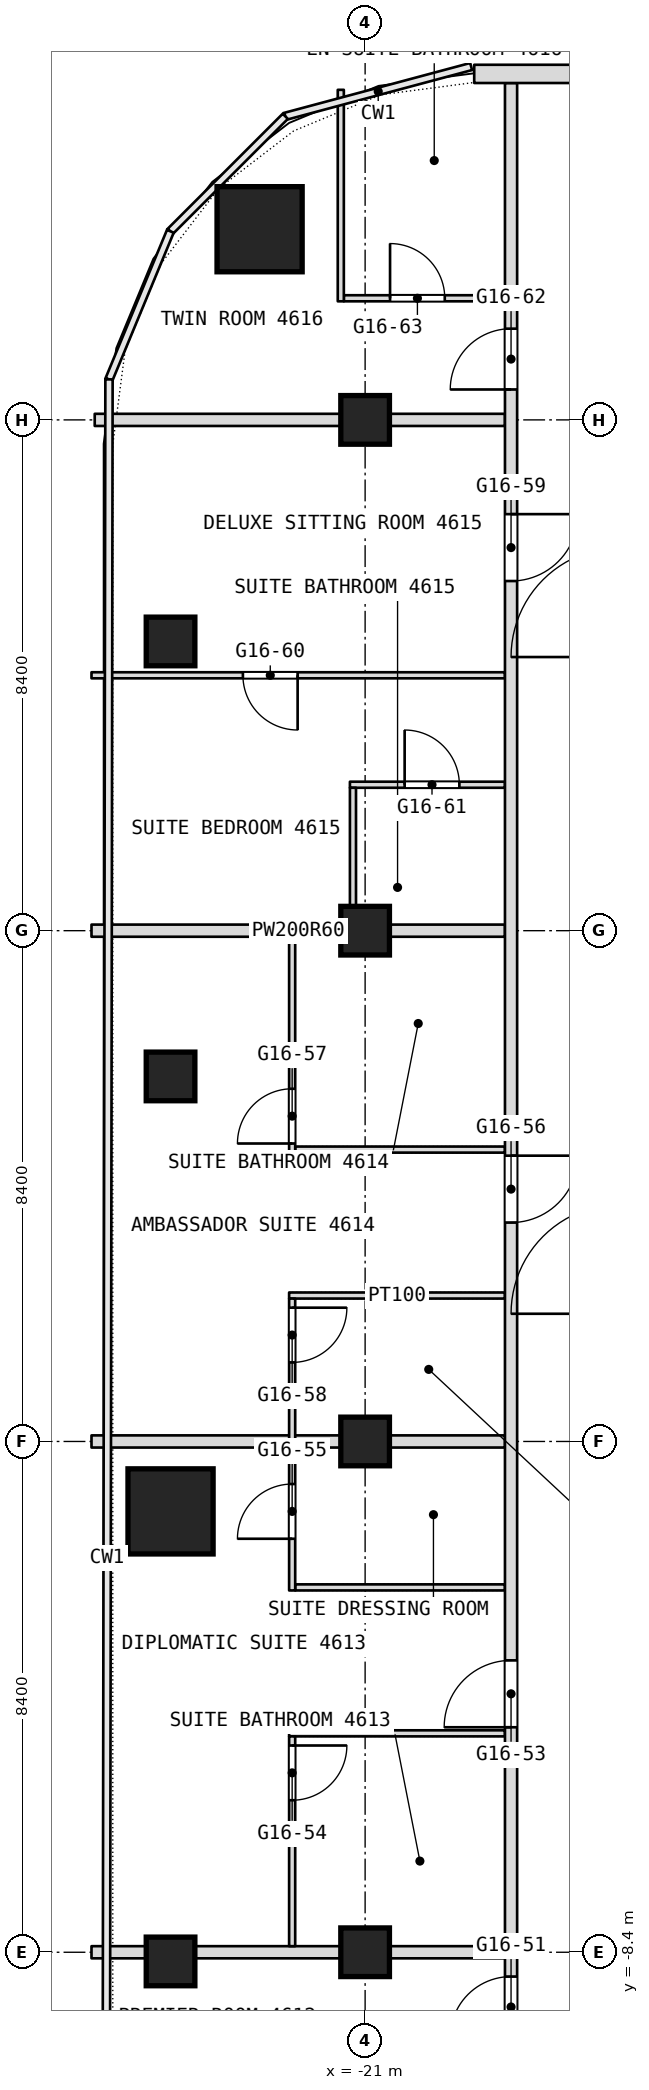
"""IFC4 building model, lengths in metres.
Left out: names, types, materials, properties, quantities, classifications, styles, units other than length and angle.
Written with IfcOpenShell. Run it as: python <this file> out.ifc"""

import sys

from ifc_helpers import new_model, si_unit, direction, frame, frame_2d, origin, origin_2d, place, context, subcontext, project, spatial, rectangle, extrude, element, fill, save


model = new_model("IFC4")
c1 = context("Model", 3, precision=1e-05, world=origin(), true_north=direction((0.0, 1.0)))
c2 = subcontext(c1, "Body", "Model", "MODEL_VIEW")
j1 = project(units=[si_unit("LENGTHUNIT", "METRE"), si_unit("PLANEANGLEUNIT", "RADIAN")], contexts=[c1])
p1 = place(None, origin())
s1 = spatial("IfcSite", under=j1, at=p1, CompositionType="ELEMENT")
p2 = place(p1, origin())
s2 = spatial("IfcBuilding", under=s1, at=p2, CompositionType="ELEMENT")
p3 = place(p2, frame((0.0, 0.0, 202.1)))
s3 = spatial("IfcBuildingStorey", under=s2, at=p3, CompositionType="ELEMENT", Elevation=202.1)
for number, where, z_axis, x_axis in (
    (1, (-22.736, 19.936, 0.0), (0.0, 0.0, 1.0), (1.0, 0.0, 0.0)),
    (2, (-24.2, -1.15, 0.0), (0.0, 0.0, 1.0), (1.0, 0.0, 0.0)),
):
    element("IfcColumn", number, at=place(p3, frame(where, z_axis=z_axis, x_axis=x_axis)), inside=s3, PredefinedType="COLUMN", context=c2, shape_type="SweptSolid", body=[
        extrude(rectangle(XDim=1.4, YDim=1.4, at=origin_2d()), origin(), (0.0, 0.0, 1.0), 3.6),
    ])
for number, where, z_axis, x_axis in (
    (3, (-21.0, -8.4, 0.0), (0.0, 0.0, 1.0), (1.0, 0.0, 0.0)),
    (4, (-21.0, 0.0, 0.0), (0.0, 0.0, 1.0), (1.0, 0.0, 0.0)),
    (5, (-21.0, 8.4, 0.0), (0.0, 0.0, 1.0), (1.0, 0.0, 0.0)),
    (6, (-21.0, 16.8, 0.0), (0.0, 0.0, 1.0), (1.0, 0.0, 0.0)),
    (7, (-24.2, -8.551, 0.0), (0.0, 0.0, 1.0), (1.0, 0.0, 0.0)),
    (8, (-24.2, 6.003, 0.0), (0.0, 0.0, 1.0), (1.0, 0.0, 0.0)),
    (9, (-24.2, 13.156, 0.0), (0.0, 0.0, 1.0), (1.0, 0.0, 0.0)),
):
    element("IfcColumn", number, at=place(p3, frame(where, z_axis=z_axis, x_axis=x_axis)), inside=s3, PredefinedType="COLUMN", context=c2, shape_type="SweptSolid", body=[
        extrude(rectangle(XDim=0.8, YDim=0.8, at=origin_2d()), origin(), (0.0, 0.0, 1.0), 3.6),
    ])
p4 = place(p3, frame((-25.5, -8.4, 0.0), z_axis=(0.0, 0.0, 1.0), x_axis=(1.0, 0.0, 0.0)))
e10 = element("IfcWall", 10, at=p4, inside=s3, PredefinedType="PARTITIONING", context=c2, shape_type="SweptSolid", body=[
    extrude(rectangle(XDim=6.8, YDim=0.2, at=frame_2d((3.4, 0.0))), origin(), (0.0, 0.0, 1.0), 2.94),
])
p5 = place(p3, frame((-22.25, -4.8, 0.0), z_axis=(0.0, 0.0, 1.0), x_axis=(1.0, 0.0, 0.0)))
e11 = element("IfcWall", 11, at=p5, inside=s3, PredefinedType="PARTITIONING", context=c2, shape_type="SweptSolid", body=[
    extrude(rectangle(XDim=3.55, YDim=0.1, at=frame_2d((1.775, 0.0))), origin(), (0.0, 0.0, 1.0), 3.34),
])
p6 = place(p3, frame((-22.15, -2.4, 0.0), z_axis=(0.0, 0.0, 1.0), x_axis=(1.0, 0.0, 0.0)))
e12 = element("IfcWall", 12, at=p6, inside=s3, PredefinedType="PARTITIONING", context=c2, shape_type="SweptSolid", body=[
    extrude(rectangle(XDim=3.45, YDim=0.1, at=frame_2d((1.725, 0.0))), origin(), (0.0, 0.0, 1.0), 3.34),
])
p7 = place(p3, frame((-25.5, 0.0, 0.0), z_axis=(0.0, 0.0, 1.0), x_axis=(1.0, 0.0, 0.0)))
e13 = element("IfcWall", 13, at=p7, inside=s3, PredefinedType="PARTITIONING", context=c2, shape_type="SweptSolid", body=[
    extrude(rectangle(XDim=6.8, YDim=0.2, at=frame_2d((3.4, 0.0))), origin(), (0.0, 0.0, 1.0), 2.94),
])
p8 = place(p3, frame((-22.25, 2.4, 0.0), z_axis=(0.0, 0.0, 1.0), x_axis=(1.0, 0.0, 0.0)))
e14 = element("IfcWall", 14, at=p8, inside=s3, PredefinedType="PARTITIONING", context=c2, shape_type="SweptSolid", body=[
    extrude(rectangle(XDim=3.55, YDim=0.1, at=frame_2d((1.775, 0.0))), origin(), (0.0, 0.0, 1.0), 3.34),
])
p9 = place(p3, frame((-22.15, 4.8, 0.0), z_axis=(0.0, 0.0, 1.0), x_axis=(1.0, 0.0, 0.0)))
e15 = element("IfcWall", 15, at=p9, inside=s3, PredefinedType="PARTITIONING", context=c2, shape_type="SweptSolid", body=[
    extrude(rectangle(XDim=3.45, YDim=0.1, at=frame_2d((1.725, 0.0))), origin(), (0.0, 0.0, 1.0), 3.34),
])
p10 = place(p3, frame((-25.5, 8.4, 0.0), z_axis=(0.0, 0.0, 1.0), x_axis=(1.0, 0.0, 0.0)))
e16 = element("IfcWall", 16, at=p10, inside=s3, PredefinedType="PARTITIONING", context=c2, shape_type="SweptSolid", body=[
    extrude(rectangle(XDim=6.8, YDim=0.2, at=frame_2d((3.4, 0.0))), origin(), (0.0, 0.0, 1.0), 2.94),
])
p11 = place(p3, frame((-21.25, 10.8, 0.0), z_axis=(0.0, 0.0, 1.0), x_axis=(1.0, 0.0, 0.0)))
e17 = element("IfcWall", 17, at=p11, inside=s3, PredefinedType="PARTITIONING", context=c2, shape_type="SweptSolid", body=[
    extrude(rectangle(XDim=2.55, YDim=0.1, at=frame_2d((1.275, 0.0))), origin(), (0.0, 0.0, 1.0), 3.34),
])
p12 = place(p11, frame((0.9, 0.0, 0.0)))
e18 = element("IfcOpeningElement", 18, at=p12, cuts=e17, PredefinedType="OPENING", context=c2, shape_type="SweptSolid", body=[
    extrude(rectangle(XDim=0.9, YDim=2.1, at=frame_2d((0.45, 1.05))), frame((0.0, 0.05, 0.0), z_axis=(0.0, -1.0, 0.0), x_axis=(1.0, 0.0, 0.0)), (0.0, 0.0, 1.0), 0.1),
])
p13 = place(p3, frame((-25.5, 12.6, 0.0), z_axis=(0.0, 0.0, 1.0), x_axis=(1.0, 0.0, 0.0)))
e19 = element("IfcWall", 19, at=p13, inside=s3, PredefinedType="PARTITIONING", context=c2, shape_type="SweptSolid", body=[
    extrude(rectangle(XDim=6.8, YDim=0.1, at=frame_2d((3.4, 0.0))), origin(), (0.0, 0.0, 1.0), 3.34),
])
p14 = place(p13, frame((2.49, 0.0, 0.0)))
e20 = element("IfcOpeningElement", 20, at=p14, cuts=e19, PredefinedType="OPENING", context=c2, shape_type="SweptSolid", body=[
    extrude(rectangle(XDim=0.9, YDim=2.1, at=frame_2d((0.45, 1.05))), frame((0.0, 0.05, 0.0), z_axis=(0.0, -1.0, 0.0), x_axis=(1.0, 0.0, 0.0)), (0.0, 0.0, 1.0), 0.1),
])
p15 = place(p3, frame((-25.447, 16.8, 0.0), z_axis=(0.0, 0.0, 1.0), x_axis=(1.0, 0.0, 0.0)))
e21 = element("IfcWall", 21, at=p15, inside=s3, PredefinedType="PARTITIONING", context=c2, shape_type="SweptSolid", body=[
    extrude(rectangle(XDim=6.747, YDim=0.2, at=frame_2d((3.374, 0.0))), origin(), (0.0, 0.0, 1.0), 2.94),
])
p16 = place(p3, frame((-18.6, -26.751, 0.0), z_axis=(0.0, 0.0, 1.0), x_axis=(0.0, 1.0, 0.0)))
e22 = element("IfcWall", 22, at=p16, inside=s3, PredefinedType="PARTITIONING", context=c2, shape_type="SweptSolid", body=[
    extrude(rectangle(XDim=49.091, YDim=0.2, at=frame_2d((24.545, 0.0))), origin(), (0.0, 0.0, 1.0), 3.34),
])
p17 = place(p16, frame((4.576, 0.0, 0.0)))
e23 = element("IfcOpeningElement", 23, at=p17, cuts=e22, PredefinedType="OPENING", context=c2, shape_type="SweptSolid", body=[
    extrude(rectangle(XDim=1.1, YDim=2.1, at=frame_2d((0.55, 1.05))), frame((0.0, 0.1, 0.0), z_axis=(0.0, -1.0, 0.0), x_axis=(1.0, 0.0, 0.0)), (0.0, 0.0, 1.0), 0.2),
])
p18 = place(p16, frame((10.351, 0.0, 0.0)))
e24 = element("IfcOpeningElement", 24, at=p18, cuts=e22, PredefinedType="OPENING", context=c2, shape_type="SweptSolid", body=[
    extrude(rectangle(XDim=1.0, YDim=2.1, at=frame_2d((0.5, 1.05))), frame((0.0, 0.1, 0.0), z_axis=(0.0, -1.0, 0.0), x_axis=(1.0, 0.0, 0.0)), (0.0, 0.0, 1.0), 0.2),
])
p19 = place(p16, frame((16.951, 0.0, 0.0)))
e25 = element("IfcOpeningElement", 25, at=p19, cuts=e22, PredefinedType="OPENING", context=c2, shape_type="SweptSolid", body=[
    extrude(rectangle(XDim=1.0, YDim=2.1, at=frame_2d((0.5, 1.05))), frame((0.0, 0.1, 0.0), z_axis=(0.0, -1.0, 0.0), x_axis=(1.0, 0.0, 0.0)), (0.0, 0.0, 1.0), 0.2),
])
p20 = place(p16, frame((22.051, 0.0, 0.0)))
e26 = element("IfcOpeningElement", 26, at=p20, cuts=e22, PredefinedType="OPENING", context=c2, shape_type="SweptSolid", body=[
    extrude(rectangle(XDim=1.1, YDim=2.1, at=frame_2d((0.55, 1.05))), frame((0.0, 0.1, 0.0), z_axis=(0.0, -1.0, 0.0), x_axis=(1.0, 0.0, 0.0)), (0.0, 0.0, 1.0), 0.2),
])
p21 = place(p16, frame((30.351, 0.0, 0.0)))
e27 = element("IfcOpeningElement", 27, at=p21, cuts=e22, PredefinedType="OPENING", context=c2, shape_type="SweptSolid", body=[
    extrude(rectangle(XDim=1.1, YDim=2.1, at=frame_2d((0.55, 1.05))), frame((0.0, 0.1, 0.0), z_axis=(0.0, -1.0, 0.0), x_axis=(1.0, 0.0, 0.0)), (0.0, 0.0, 1.0), 0.2),
])
p22 = place(p16, frame((40.901, 0.0, 0.0)))
e28 = element("IfcOpeningElement", 28, at=p22, cuts=e22, PredefinedType="OPENING", context=c2, shape_type="SweptSolid", body=[
    extrude(rectangle(XDim=1.1, YDim=2.1, at=frame_2d((0.55, 1.05))), frame((0.0, 0.1, 0.0), z_axis=(0.0, -1.0, 0.0), x_axis=(1.0, 0.0, 0.0)), (0.0, 0.0, 1.0), 0.2),
])
p23 = place(p16, frame((44.051, 0.0, 0.0)))
e29 = element("IfcOpeningElement", 29, at=p23, cuts=e22, PredefinedType="OPENING", context=c2, shape_type="SweptSolid", body=[
    extrude(rectangle(XDim=1.0, YDim=2.1, at=frame_2d((0.5, 1.05))), frame((0.0, 0.1, 0.0), z_axis=(0.0, -1.0, 0.0), x_axis=(1.0, 0.0, 0.0)), (0.0, 0.0, 1.0), 0.2),
])
p24 = place(p3, frame((-21.35, 18.8, 0.0), z_axis=(0.0, 0.0, 1.0), x_axis=(1.0, 0.0, 0.0)))
e30 = element("IfcWall", 30, at=p24, inside=s3, PredefinedType="PARTITIONING", context=c2, shape_type="SweptSolid", body=[
    extrude(rectangle(XDim=2.65, YDim=0.1, at=frame_2d((1.325, 0.0))), origin(), (0.0, 0.0, 1.0), 3.34),
])
p25 = place(p24, frame((0.76, 0.0, 0.0)))
e31 = element("IfcOpeningElement", 31, at=p25, cuts=e30, PredefinedType="OPENING", context=c2, shape_type="SweptSolid", body=[
    extrude(rectangle(XDim=0.9, YDim=2.1, at=frame_2d((0.45, 1.05))), frame((0.0, 0.05, 0.0), z_axis=(0.0, -1.0, 0.0), x_axis=(1.0, 0.0, 0.0)), (0.0, 0.0, 1.0), 0.1),
])
p26 = place(p3, frame((-21.2, 8.5, 0.0), z_axis=(0.0, 0.0, 1.0), x_axis=(0.0, 1.0, 0.0)))
e32 = element("IfcWall", 32, at=p26, inside=s3, PredefinedType="PARTITIONING", context=c2, shape_type="SweptSolid", body=[
    extrude(rectangle(XDim=2.25, YDim=0.1, at=frame_2d((1.125, 0.0))), origin(), (0.0, 0.0, 1.0), 3.34),
])
p27 = place(p3, frame((-21.4, 18.75, 0.0), z_axis=(0.0, 0.0, 1.0), x_axis=(0.0, 1.0, 0.0)))
e33 = element("IfcWall", 33, at=p27, inside=s3, PredefinedType="PARTITIONING", context=c2, shape_type="SweptSolid", body=[
    extrude(rectangle(XDim=3.478, YDim=0.1, at=frame_2d((1.739, 0.0))), origin(), (0.0, 0.0, 1.0), 3.34),
])
p28 = place(p3, frame((-22.2, -8.3, 0.0), z_axis=(0.0, 0.0, 1.0), x_axis=(0.0, 1.0, 0.0)))
e34 = element("IfcWall", 34, at=p28, inside=s3, PredefinedType="PARTITIONING", context=c2, shape_type="SweptSolid", body=[
    extrude(rectangle(XDim=3.45, YDim=0.1, at=frame_2d((1.725, 0.0))), origin(), (0.0, 0.0, 1.0), 3.34),
])
p29 = place(p28, frame((2.4, 0.0, 0.0)))
e35 = element("IfcOpeningElement", 35, at=p29, cuts=e34, PredefinedType="OPENING", context=c2, shape_type="SweptSolid", body=[
    extrude(rectangle(XDim=0.9, YDim=2.1, at=frame_2d((0.45, 1.05))), frame((0.0, 0.05, 0.0), z_axis=(0.0, -1.0, 0.0), x_axis=(1.0, 0.0, 0.0)), (0.0, 0.0, 1.0), 0.1),
])
p30 = place(p3, frame((-22.2, -2.45, 0.0), z_axis=(0.0, 0.0, 1.0), x_axis=(0.0, 1.0, 0.0)))
e36 = element("IfcWall", 36, at=p30, inside=s3, PredefinedType="PARTITIONING", context=c2, shape_type="SweptSolid", body=[
    extrude(rectangle(XDim=4.8, YDim=0.1, at=frame_2d((2.4, 0.0))), origin(), (0.0, 0.0, 1.0), 3.34),
])
p31 = place(p30, frame((0.85, 0.0, 0.0)))
e37 = element("IfcOpeningElement", 37, at=p31, cuts=e36, PredefinedType="OPENING", context=c2, shape_type="SweptSolid", body=[
    extrude(rectangle(XDim=0.9, YDim=2.1, at=frame_2d((0.45, 1.05))), frame((0.0, 0.05, 0.0), z_axis=(0.0, -1.0, 0.0), x_axis=(1.0, 0.0, 0.0)), (0.0, 0.0, 1.0), 0.1),
])
p32 = place(p30, frame((3.75, 0.0, 0.0)))
e38 = element("IfcOpeningElement", 38, at=p32, cuts=e36, PredefinedType="OPENING", context=c2, shape_type="SweptSolid", body=[
    extrude(rectangle(XDim=0.9, YDim=2.1, at=frame_2d((0.45, 1.05))), frame((0.0, 0.05, 0.0), z_axis=(0.0, -1.0, 0.0), x_axis=(1.0, 0.0, 0.0)), (0.0, 0.0, 1.0), 0.1),
])
p33 = place(p3, frame((-22.2, 4.75, 0.0), z_axis=(0.0, 0.0, 1.0), x_axis=(0.0, 1.0, 0.0)))
e39 = element("IfcWall", 39, at=p33, inside=s3, PredefinedType="PARTITIONING", context=c2, shape_type="SweptSolid", body=[
    extrude(rectangle(XDim=3.75, YDim=0.1, at=frame_2d((1.875, 0.0))), origin(), (0.0, 0.0, 1.0), 3.34),
])
p34 = place(p33, frame((0.15, 0.0, 0.0)))
e40 = element("IfcOpeningElement", 40, at=p34, cuts=e39, PredefinedType="OPENING", context=c2, shape_type="SweptSolid", body=[
    extrude(rectangle(XDim=0.9, YDim=2.1, at=frame_2d((0.45, 1.05))), frame((0.0, 0.05, 0.0), z_axis=(0.0, -1.0, 0.0), x_axis=(1.0, 0.0, 0.0)), (0.0, 0.0, 1.0), 0.1),
])
p35 = place(p3, frame((19.206, 22.49, 0.0), z_axis=(0.0, 0.0, 1.0), x_axis=(-1.0, 0.0, 0.0)))
e41 = element("IfcWall", 41, at=p35, inside=s3, PredefinedType="NOTDEFINED", context=c2, shape_type="SweptSolid", body=[
    extrude(rectangle(XDim=38.412, YDim=0.3, at=frame_2d((19.206, 0.0))), origin(), (0.0, 0.0, 1.0), 3.6),
])
p36 = place(p35, frame((3.306, 0.0, 0.9)))
e42 = element("IfcOpeningElement", 42, at=p36, cuts=e41, PredefinedType="OPENING", context=c2, shape_type="SweptSolid", body=[
    extrude(rectangle(XDim=2.4, YDim=2.1, at=frame_2d((1.2, 1.05))), frame((0.0, 0.15, 0.0), z_axis=(0.0, -1.0, 0.0), x_axis=(1.0, 0.0, 0.0)), (0.0, 0.0, 1.0), 0.3),
])
p37 = place(p35, frame((7.506, 0.0, 0.9)))
e43 = element("IfcOpeningElement", 43, at=p37, cuts=e41, PredefinedType="OPENING", context=c2, shape_type="SweptSolid", body=[
    extrude(rectangle(XDim=2.4, YDim=2.1, at=frame_2d((1.2, 1.05))), frame((0.0, 0.15, 0.0), z_axis=(0.0, -1.0, 0.0), x_axis=(1.0, 0.0, 0.0)), (0.0, 0.0, 1.0), 0.3),
])
p38 = place(p35, frame((11.706, 0.0, 0.9)))
e44 = element("IfcOpeningElement", 44, at=p38, cuts=e41, PredefinedType="OPENING", context=c2, shape_type="SweptSolid", body=[
    extrude(rectangle(XDim=2.4, YDim=2.1, at=frame_2d((1.2, 1.05))), frame((0.0, 0.15, 0.0), z_axis=(0.0, -1.0, 0.0), x_axis=(1.0, 0.0, 0.0)), (0.0, 0.0, 1.0), 0.3),
])
p39 = place(p35, frame((15.906, 0.0, 0.9)))
e45 = element("IfcOpeningElement", 45, at=p39, cuts=e41, PredefinedType="OPENING", context=c2, shape_type="SweptSolid", body=[
    extrude(rectangle(XDim=2.4, YDim=2.1, at=frame_2d((1.2, 1.05))), frame((0.0, 0.15, 0.0), z_axis=(0.0, -1.0, 0.0), x_axis=(1.0, 0.0, 0.0)), (0.0, 0.0, 1.0), 0.3),
])
p40 = place(p35, frame((20.106, 0.0, 0.9)))
e46 = element("IfcOpeningElement", 46, at=p40, cuts=e41, PredefinedType="OPENING", context=c2, shape_type="SweptSolid", body=[
    extrude(rectangle(XDim=2.4, YDim=2.1, at=frame_2d((1.2, 1.05))), frame((0.0, 0.15, 0.0), z_axis=(0.0, -1.0, 0.0), x_axis=(1.0, 0.0, 0.0)), (0.0, 0.0, 1.0), 0.3),
])
p41 = place(p35, frame((24.306, 0.0, 0.9)))
e47 = element("IfcOpeningElement", 47, at=p41, cuts=e41, PredefinedType="OPENING", context=c2, shape_type="SweptSolid", body=[
    extrude(rectangle(XDim=2.4, YDim=2.1, at=frame_2d((1.2, 1.05))), frame((0.0, 0.15, 0.0), z_axis=(0.0, -1.0, 0.0), x_axis=(1.0, 0.0, 0.0)), (0.0, 0.0, 1.0), 0.3),
])
p42 = place(p35, frame((28.506, 0.0, 0.9)))
e48 = element("IfcOpeningElement", 48, at=p42, cuts=e41, PredefinedType="OPENING", context=c2, shape_type="SweptSolid", body=[
    extrude(rectangle(XDim=2.4, YDim=2.1, at=frame_2d((1.2, 1.05))), frame((0.0, 0.15, 0.0), z_axis=(0.0, -1.0, 0.0), x_axis=(1.0, 0.0, 0.0)), (0.0, 0.0, 1.0), 0.3),
])
p43 = place(p35, frame((32.706, 0.0, 0.9)))
e49 = element("IfcOpeningElement", 49, at=p43, cuts=e41, PredefinedType="OPENING", context=c2, shape_type="SweptSolid", body=[
    extrude(rectangle(XDim=2.4, YDim=2.1, at=frame_2d((1.2, 1.05))), frame((0.0, 0.15, 0.0), z_axis=(0.0, -1.0, 0.0), x_axis=(1.0, 0.0, 0.0)), (0.0, 0.0, 1.0), 0.3),
])
p44 = place(p12, origin())
e50 = element("IfcDoor", 50, at=p44, inside=s3, OperationType="SINGLE_SWING_LEFT", PredefinedType="DOOR", context=c2, shape_type="SweptSolid", body=[
    extrude(rectangle(XDim=0.9, YDim=2.1, at=frame_2d((0.45, 1.05))), frame((0.0, 0.025, 0.0), z_axis=(0.0, -1.0, 0.0), x_axis=(1.0, 0.0, 0.0)), (0.0, 0.0, 1.0), 0.05),
])
fill(e18, e50)
p45 = place(p14, origin())
e51 = element("IfcDoor", 51, at=p45, inside=s3, OperationType="SINGLE_SWING_RIGHT", PredefinedType="DOOR", context=c2, shape_type="SweptSolid", body=[
    extrude(rectangle(XDim=0.9, YDim=2.1, at=frame_2d((0.45, 1.05))), frame((0.0, 0.025, 0.0), z_axis=(0.0, -1.0, 0.0), x_axis=(1.0, 0.0, 0.0)), (0.0, 0.0, 1.0), 0.05),
])
fill(e20, e51)
p46 = place(p19, origin())
e52 = element("IfcDoor", 52, at=p46, inside=s3, OperationType="SINGLE_SWING_RIGHT", PredefinedType="DOOR", context=c2, shape_type="SweptSolid", body=[
    extrude(rectangle(XDim=1.0, YDim=2.1, at=frame_2d((0.5, 1.05))), frame((0.0, 0.025, 0.0), z_axis=(0.0, -1.0, 0.0), x_axis=(1.0, 0.0, 0.0)), (0.0, 0.0, 1.0), 0.05),
])
fill(e25, e52)
p47 = place(p20, origin())
e53 = element("IfcDoor", 53, at=p47, inside=s3, OperationType="SINGLE_SWING_LEFT", PredefinedType="DOOR", context=c2, shape_type="SweptSolid", body=[
    extrude(rectangle(XDim=1.1, YDim=2.1, at=frame_2d((0.55, 1.05))), frame((0.0, 0.025, 0.0), z_axis=(0.0, -1.0, 0.0), x_axis=(1.0, 0.0, 0.0)), (0.0, 0.0, 1.0), 0.05),
])
fill(e26, e53)
p48 = place(p21, origin())
e54 = element("IfcDoor", 54, at=p48, inside=s3, OperationType="SINGLE_SWING_RIGHT", PredefinedType="DOOR", context=c2, shape_type="SweptSolid", body=[
    extrude(rectangle(XDim=1.1, YDim=2.1, at=frame_2d((0.55, 1.05))), frame((0.0, 0.025, 0.0), z_axis=(0.0, -1.0, 0.0), x_axis=(1.0, 0.0, 0.0)), (0.0, 0.0, 1.0), 0.05),
])
fill(e27, e54)
p49 = place(p22, origin())
e55 = element("IfcDoor", 55, at=p49, inside=s3, OperationType="SINGLE_SWING_RIGHT", PredefinedType="DOOR", context=c2, shape_type="SweptSolid", body=[
    extrude(rectangle(XDim=1.1, YDim=2.1, at=frame_2d((0.55, 1.05))), frame((0.0, 0.025, 0.0), z_axis=(0.0, -1.0, 0.0), x_axis=(1.0, 0.0, 0.0)), (0.0, 0.0, 1.0), 0.05),
])
fill(e28, e55)
p50 = place(p23, origin())
e56 = element("IfcDoor", 56, at=p50, inside=s3, OperationType="SINGLE_SWING_LEFT", PredefinedType="DOOR", context=c2, shape_type="SweptSolid", body=[
    extrude(rectangle(XDim=1.0, YDim=2.1, at=frame_2d((0.5, 1.05))), frame((0.0, 0.025, 0.0), z_axis=(0.0, -1.0, 0.0), x_axis=(1.0, 0.0, 0.0)), (0.0, 0.0, 1.0), 0.05),
])
fill(e29, e56)
p51 = place(p25, origin())
e57 = element("IfcDoor", 57, at=p51, inside=s3, OperationType="SINGLE_SWING_LEFT", PredefinedType="DOOR", context=c2, shape_type="SweptSolid", body=[
    extrude(rectangle(XDim=0.9, YDim=2.1, at=frame_2d((0.45, 1.05))), frame((0.0, 0.025, 0.0), z_axis=(0.0, -1.0, 0.0), x_axis=(1.0, 0.0, 0.0)), (0.0, 0.0, 1.0), 0.05),
])
fill(e31, e57)
p52 = place(p29, origin())
e58 = element("IfcDoor", 58, at=p52, inside=s3, OperationType="SINGLE_SWING_LEFT", PredefinedType="DOOR", context=c2, shape_type="SweptSolid", body=[
    extrude(rectangle(XDim=0.9, YDim=2.1, at=frame_2d((0.45, 1.05))), frame((0.0, 0.025, 0.0), z_axis=(0.0, -1.0, 0.0), x_axis=(1.0, 0.0, 0.0)), (0.0, 0.0, 1.0), 0.05),
])
fill(e35, e58)
p53 = place(p31, origin())
e59 = element("IfcDoor", 59, at=p53, inside=s3, OperationType="SINGLE_SWING_LEFT", PredefinedType="DOOR", context=c2, shape_type="SweptSolid", body=[
    extrude(rectangle(XDim=0.9, YDim=2.1, at=frame_2d((0.45, 1.05))), frame((0.0, 0.025, 0.0), z_axis=(0.0, -1.0, 0.0), x_axis=(1.0, 0.0, 0.0)), (0.0, 0.0, 1.0), 0.05),
])
fill(e37, e59)
p54 = place(p32, origin())
e60 = element("IfcDoor", 60, at=p54, inside=s3, OperationType="SINGLE_SWING_LEFT", PredefinedType="DOOR", context=c2, shape_type="SweptSolid", body=[
    extrude(rectangle(XDim=0.9, YDim=2.1, at=frame_2d((0.45, 1.05))), frame((0.0, 0.025, 0.0), z_axis=(0.0, -1.0, 0.0), x_axis=(1.0, 0.0, 0.0)), (0.0, 0.0, 1.0), 0.05),
])
fill(e38, e60)
p55 = place(p34, origin())
e61 = element("IfcDoor", 61, at=p55, inside=s3, OperationType="SINGLE_SWING_RIGHT", PredefinedType="DOOR", context=c2, shape_type="SweptSolid", body=[
    extrude(rectangle(XDim=0.9, YDim=2.1, at=frame_2d((0.45, 1.05))), frame((0.0, 0.025, 0.0), z_axis=(0.0, -1.0, 0.0), x_axis=(1.0, 0.0, 0.0)), (0.0, 0.0, 1.0), 0.05),
])
fill(e40, e61)
save(model, sys.argv[1])
